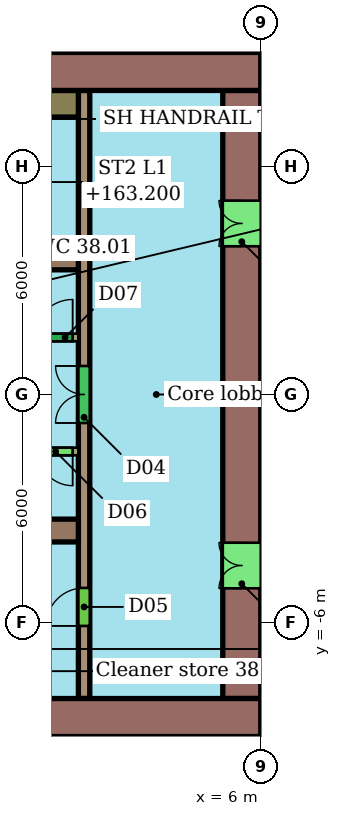
"""IFC4 building model, lengths in metres.
Left out: names, types, materials, properties, quantities, classifications, styles, units other than length and angle.
Written with IfcOpenShell. Run it as: python <this file> out.ifc"""

import sys

from ifc_helpers import new_model, si_unit, direction, frame, frame_2d, origin, place, context, subcontext, project, spatial, rectangle, extrude, element, fill, save


model = new_model("IFC4")
c1 = context("Model", 3, precision=1e-05, world=origin(), true_north=direction((0.0, 1.0)))
c2 = subcontext(c1, "Body", "Model", "MODEL_VIEW")
j1 = project(units=[si_unit("LENGTHUNIT", "METRE"), si_unit("PLANEANGLEUNIT", "RADIAN")], contexts=[c1])
p1 = place(None, origin())
s1 = spatial("IfcSite", under=j1, at=p1, CompositionType="ELEMENT")
p2 = place(p1, origin())
s2 = spatial("IfcBuilding", under=s1, at=p2, CompositionType="ELEMENT")
p3 = place(p2, frame((0.0, 0.0, 161.4)))
s3 = spatial("IfcBuildingStorey", under=s2, at=p3, CompositionType="ELEMENT", Elevation=161.4)
p4 = place(p3, frame((6.0, 8.5, 0.0), z_axis=(0.0, 0.0, 1.0), x_axis=(-1.0, 0.0, 0.0)))
e1 = element("IfcWall", 1, at=p4, inside=s3, PredefinedType="SHEAR", context=c2, shape_type="SweptSolid", body=[
    extrude(rectangle(XDim=12.0, YDim=1.0, at=frame_2d((6.0, 0.0))), origin(), (0.0, 0.0, 1.0), 3.3),
])
p5 = place(p4, frame((5.6, 0.0, 0.0)))
e2 = element("IfcOpeningElement", 2, at=p5, cuts=e1, PredefinedType="OPENING", context=c2, shape_type="SweptSolid", body=[
    extrude(rectangle(XDim=1.2, YDim=2.1, at=frame_2d((0.6, 1.05))), frame((0.0, 0.51, 0.0), z_axis=(0.0, -1.0, 0.0), x_axis=(1.0, 0.0, 0.0)), (0.0, 0.0, 1.0), 1.02),
])
p6 = place(p3, frame((-18.0, -8.5, 0.0), z_axis=(0.0, 0.0, 1.0), x_axis=(1.0, 0.0, 0.0)))
e3 = element("IfcWall", 3, at=p6, inside=s3, PredefinedType="SHEAR", context=c2, shape_type="SweptSolid", body=[
    extrude(rectangle(XDim=24.0, YDim=1.0, at=frame_2d((12.0, 0.0))), origin(), (0.0, 0.0, 1.0), 3.3),
])
p7 = place(p6, frame((6.0, 0.0, 0.0)))
e4 = element("IfcOpeningElement", 4, at=p7, cuts=e3, PredefinedType="OPENING", context=c2, shape_type="SweptSolid", body=[
    extrude(rectangle(XDim=1.2, YDim=2.1, at=frame_2d((0.6, 1.05))), frame((0.0, 0.51, 0.0), z_axis=(0.0, -1.0, 0.0), x_axis=(1.0, 0.0, 0.0)), (0.0, 0.0, 1.0), 1.02),
])
p8 = place(p3, frame((5.5, -8.0, 0.0), z_axis=(0.0, 0.0, 1.0), x_axis=(0.0, 1.0, 0.0)))
e5 = element("IfcWall", 5, at=p8, inside=s3, PredefinedType="SHEAR", context=c2, shape_type="SweptSolid", body=[
    extrude(rectangle(XDim=16.0, YDim=1.0, at=frame_2d((8.0, 0.0))), origin(), (0.0, 0.0, 1.0), 3.3),
])
p9 = place(p8, frame((2.9, 0.0, 0.0)))
e6 = element("IfcOpeningElement", 6, at=p9, cuts=e5, PredefinedType="OPENING", context=c2, shape_type="SweptSolid", body=[
    extrude(rectangle(XDim=1.2, YDim=2.1, at=frame_2d((0.6, 1.05))), frame((0.0, 0.51, 0.0), z_axis=(0.0, -1.0, 0.0), x_axis=(1.0, 0.0, 0.0)), (0.0, 0.0, 1.0), 1.02),
])
p10 = place(p8, frame((11.9, 0.0, 0.0)))
e7 = element("IfcOpeningElement", 7, at=p10, cuts=e5, PredefinedType="OPENING", context=c2, shape_type="SweptSolid", body=[
    extrude(rectangle(XDim=1.2, YDim=2.1, at=frame_2d((0.6, 1.05))), frame((0.0, 0.51, 0.0), z_axis=(0.0, -1.0, 0.0), x_axis=(1.0, 0.0, 0.0)), (0.0, 0.0, 1.0), 1.02),
])
for number, where, z_axis, x_axis in (
    (8, (-6.0, 3.58, 0.0), (0.0, 0.0, 1.0), (1.0, 0.0, 0.0)),
    (9, (-6.0, -3.58, 0.0), (0.0, 0.0, 1.0), (1.0, 0.0, 0.0)),
):
    element("IfcWall", number, at=place(p3, frame(where, z_axis=z_axis, x_axis=x_axis)), inside=s3, PredefinedType="SHEAR", context=c2, shape_type="SweptSolid", body=[
        extrude(rectangle(XDim=7.2, YDim=0.6, at=frame_2d((3.6, 0.0))), origin(), (0.0, 0.0, 1.0), 3.3),
    ])
p11 = place(p3, frame((1.35, -8.0, 0.0), z_axis=(0.0, 0.0, 1.0), x_axis=(0.0, 1.0, 0.0)))
e10 = element("IfcWall", 10, at=p11, inside=s3, PredefinedType="SHEAR", context=c2, shape_type="SweptSolid", body=[
    extrude(rectangle(XDim=16.0, YDim=0.3, at=frame_2d((8.0, 0.0))), origin(), (0.0, 0.0, 1.0), 3.3),
])
p12 = place(p11, frame((1.91, 0.0, 0.0)))
e11 = element("IfcOpeningElement", 11, at=p12, cuts=e10, PredefinedType="OPENING", context=c2, shape_type="SweptSolid", body=[
    extrude(rectangle(XDim=1.0, YDim=2.1, at=frame_2d((0.5, 1.05))), frame((0.0, 0.16, 0.0), z_axis=(0.0, -1.0, 0.0), x_axis=(1.0, 0.0, 0.0)), (0.0, 0.0, 1.0), 0.32),
])
p13 = place(p11, frame((7.25, 0.0, 0.0)))
e12 = element("IfcOpeningElement", 12, at=p13, cuts=e10, PredefinedType="OPENING", context=c2, shape_type="SweptSolid", body=[
    extrude(rectangle(XDim=1.5, YDim=2.1, at=frame_2d((0.75, 1.05))), frame((0.0, 0.16, 0.0), z_axis=(0.0, -1.0, 0.0), x_axis=(1.0, 0.0, 0.0)), (0.0, 0.0, 1.0), 0.32),
])
p14 = place(p3, frame((-13.2, 1.5, 0.0), z_axis=(0.0, 0.0, 1.0), x_axis=(1.0, 0.0, 0.0)))
e13 = element("IfcWall", 13, at=p14, inside=s3, PredefinedType="SHEAR", context=c2, shape_type="SweptSolid", body=[
    extrude(rectangle(XDim=14.4, YDim=0.2, at=frame_2d((7.2, 0.0))), origin(), (0.0, 0.0, 1.0), 3.3),
])
p15 = place(p14, frame((0.546, 0.0, 0.0)))
e14 = element("IfcOpeningElement", 14, at=p15, cuts=e13, PredefinedType="OPENING", context=c2, shape_type="SweptSolid", body=[
    extrude(rectangle(XDim=1.1, YDim=2.1, at=frame_2d((0.55, 1.05))), frame((0.0, 0.11, 0.0), z_axis=(0.0, -1.0, 0.0), x_axis=(1.0, 0.0, 0.0)), (0.0, 0.0, 1.0), 0.22),
])
p16 = place(p14, frame((2.988, 0.0, 0.0)))
e15 = element("IfcOpeningElement", 15, at=p16, cuts=e13, PredefinedType="OPENING", context=c2, shape_type="SweptSolid", body=[
    extrude(rectangle(XDim=1.1, YDim=2.1, at=frame_2d((0.55, 1.05))), frame((0.0, 0.11, 0.0), z_axis=(0.0, -1.0, 0.0), x_axis=(1.0, 0.0, 0.0)), (0.0, 0.0, 1.0), 0.22),
])
p17 = place(p14, frame((5.429, 0.0, 0.0)))
e16 = element("IfcOpeningElement", 16, at=p17, cuts=e13, PredefinedType="OPENING", context=c2, shape_type="SweptSolid", body=[
    extrude(rectangle(XDim=1.1, YDim=2.1, at=frame_2d((0.55, 1.05))), frame((0.0, 0.11, 0.0), z_axis=(0.0, -1.0, 0.0), x_axis=(1.0, 0.0, 0.0)), (0.0, 0.0, 1.0), 0.22),
])
p18 = place(p14, frame((7.871, 0.0, 0.0)))
e17 = element("IfcOpeningElement", 17, at=p18, cuts=e13, PredefinedType="OPENING", context=c2, shape_type="SweptSolid", body=[
    extrude(rectangle(XDim=1.1, YDim=2.1, at=frame_2d((0.55, 1.05))), frame((0.0, 0.11, 0.0), z_axis=(0.0, -1.0, 0.0), x_axis=(1.0, 0.0, 0.0)), (0.0, 0.0, 1.0), 0.22),
])
p19 = place(p14, frame((11.607, 0.0, 0.0)))
e18 = element("IfcOpeningElement", 18, at=p19, cuts=e13, PredefinedType="OPENING", context=c2, shape_type="SweptSolid", body=[
    extrude(rectangle(XDim=0.9, YDim=2.1, at=frame_2d((0.45, 1.05))), frame((0.0, 0.11, 0.0), z_axis=(0.0, -1.0, 0.0), x_axis=(1.0, 0.0, 0.0)), (0.0, 0.0, 1.0), 0.22),
])
p20 = place(p14, frame((13.25, 0.0, 0.0)))
e19 = element("IfcOpeningElement", 19, at=p20, cuts=e13, PredefinedType="OPENING", context=c2, shape_type="SweptSolid", body=[
    extrude(rectangle(XDim=1.0, YDim=2.1, at=frame_2d((0.5, 1.05))), frame((0.0, 0.11, 0.0), z_axis=(0.0, -1.0, 0.0), x_axis=(1.0, 0.0, 0.0)), (0.0, 0.0, 1.0), 0.22),
])
p21 = place(p3, frame((1.2, -1.5, 0.0), z_axis=(0.0, 0.0, 1.0), x_axis=(-1.0, 0.0, 0.0)))
e20 = element("IfcWall", 20, at=p21, inside=s3, PredefinedType="SHEAR", context=c2, shape_type="SweptSolid", body=[
    extrude(rectangle(XDim=14.4, YDim=0.2, at=frame_2d((7.2, 0.0))), origin(), (0.0, 0.0, 1.0), 3.3),
])
p22 = place(p21, frame((7.821, 0.0, 0.0)))
e21 = element("IfcOpeningElement", 21, at=p22, cuts=e20, PredefinedType="OPENING", context=c2, shape_type="SweptSolid", body=[
    extrude(rectangle(XDim=1.2, YDim=2.1, at=frame_2d((0.6, 1.05))), frame((0.0, 0.11, 0.0), z_axis=(0.0, -1.0, 0.0), x_axis=(1.0, 0.0, 0.0)), (0.0, 0.0, 1.0), 0.22),
])
p23 = place(p21, frame((0.15, 0.0, 0.0)))
e22 = element("IfcOpeningElement", 22, at=p23, cuts=e20, PredefinedType="OPENING", context=c2, shape_type="SweptSolid", body=[
    extrude(rectangle(XDim=0.9, YDim=2.1, at=frame_2d((0.45, 1.05))), frame((0.0, 0.11, 0.0), z_axis=(0.0, -1.0, 0.0), x_axis=(1.0, 0.0, 0.0)), (0.0, 0.0, 1.0), 0.22),
])
p24 = place(p3, frame((0.4, 7.65, 0.0), z_axis=(0.0, 0.0, 1.0), x_axis=(1.0, 0.0, 0.0)))
e23 = element("IfcWall", 23, at=p24, inside=s3, PredefinedType="SHEAR", context=c2, shape_type="SweptSolid", body=[
    extrude(rectangle(XDim=0.8, YDim=0.7, at=frame_2d((0.4, 0.0))), origin(), (0.0, 0.0, 1.0), 3.3),
])
p25 = place(p9, origin())
e24 = element("IfcDoor", 24, at=p25, inside=s3, OperationType="DOUBLE_DOOR_SINGLE_SWING", PredefinedType="NOTDEFINED", context=c2, shape_type="SweptSolid", body=[
    extrude(rectangle(XDim=1.2, YDim=2.1, at=frame_2d((0.6, 1.05))), frame((0.0, 0.025, 0.0), z_axis=(0.0, -1.0, 0.0), x_axis=(1.0, 0.0, 0.0)), (0.0, 0.0, 1.0), 0.05),
])
fill(e6, e24)
p26 = place(p10, origin())
e25 = element("IfcDoor", 25, at=p26, inside=s3, OperationType="DOUBLE_DOOR_SINGLE_SWING", PredefinedType="NOTDEFINED", context=c2, shape_type="SweptSolid", body=[
    extrude(rectangle(XDim=1.2, YDim=2.1, at=frame_2d((0.6, 1.05))), frame((0.0, 0.025, 0.0), z_axis=(0.0, -1.0, 0.0), x_axis=(1.0, 0.0, 0.0)), (0.0, 0.0, 1.0), 0.05),
])
fill(e7, e25)
p27 = place(p12, origin())
e26 = element("IfcDoor", 26, at=p27, inside=s3, OperationType="SINGLE_SWING_LEFT", PredefinedType="NOTDEFINED", context=c2, shape_type="SweptSolid", body=[
    extrude(rectangle(XDim=1.0, YDim=2.1, at=frame_2d((0.5, 1.05))), frame((0.0, 0.025, 0.0), z_axis=(0.0, -1.0, 0.0), x_axis=(1.0, 0.0, 0.0)), (0.0, 0.0, 1.0), 0.05),
])
fill(e11, e26)
p28 = place(p13, origin())
e27 = element("IfcDoor", 27, at=p28, inside=s3, OperationType="DOUBLE_DOOR_SINGLE_SWING", PredefinedType="NOTDEFINED", context=c2, shape_type="SweptSolid", body=[
    extrude(rectangle(XDim=1.5, YDim=2.1, at=frame_2d((0.75, 1.05))), frame((0.0, 0.025, 0.0), z_axis=(0.0, -1.0, 0.0), x_axis=(1.0, 0.0, 0.0)), (0.0, 0.0, 1.0), 0.05),
])
fill(e12, e27)
p29 = place(p20, origin())
e28 = element("IfcDoor", 28, at=p29, inside=s3, OperationType="SINGLE_SWING_RIGHT", PredefinedType="NOTDEFINED", context=c2, shape_type="SweptSolid", body=[
    extrude(rectangle(XDim=1.0, YDim=2.1, at=frame_2d((0.5, 1.05))), frame((0.0, 0.025, 0.0), z_axis=(0.0, -1.0, 0.0), x_axis=(1.0, 0.0, 0.0)), (0.0, 0.0, 1.0), 0.05),
])
fill(e19, e28)
p30 = place(p23, origin())
e29 = element("IfcDoor", 29, at=p30, inside=s3, OperationType="SINGLE_SWING_LEFT", PredefinedType="NOTDEFINED", context=c2, shape_type="SweptSolid", body=[
    extrude(rectangle(XDim=0.9, YDim=2.1, at=frame_2d((0.45, 1.05))), frame((0.0, 0.025, 0.0), z_axis=(0.0, -1.0, 0.0), x_axis=(1.0, 0.0, 0.0)), (0.0, 0.0, 1.0), 0.05),
])
fill(e22, e29)
save(model, sys.argv[1])
